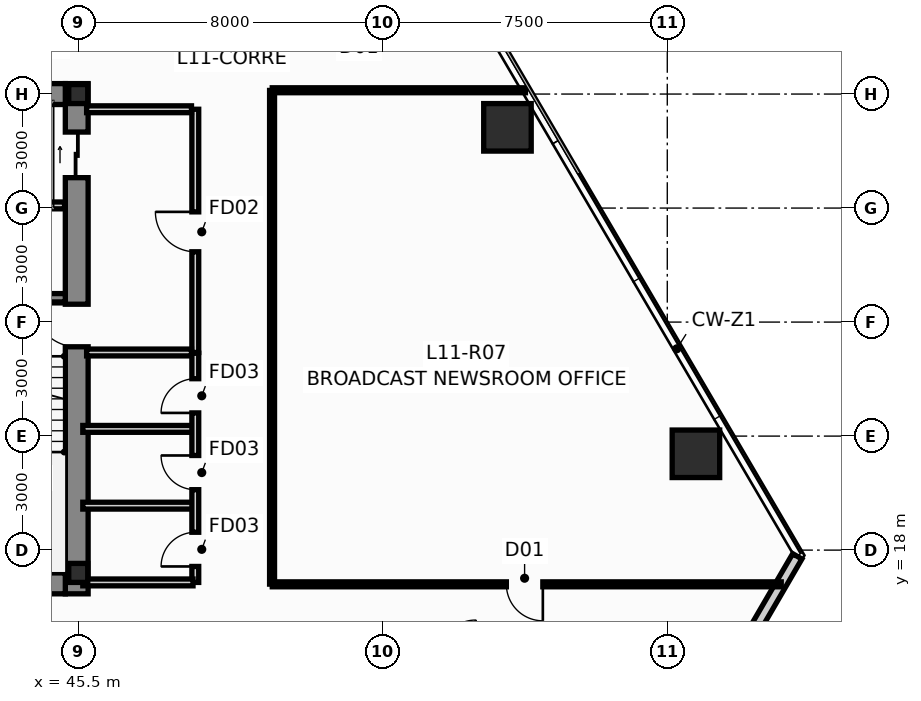
"""IFC4 building model, lengths in metres.
Left out: names, types, materials, properties, quantities, classifications, styles, units other than length and angle.
Written with IfcOpenShell. Run it as: python <this file> out.ifc"""

import sys

from ifc_helpers import new_model, si_unit, direction, frame, frame_2d, origin, origin_2d, place, context, subcontext, project, spatial, rectangle, hollow_rectangle, i_section, extrude, source, transform, mapped, element, fill, save


model = new_model("IFC4")
c1 = context("Model", 3, precision=1e-05, world=origin(), true_north=direction((0.0, 1.0)))
c2 = subcontext(c1, "Body", "Model", "MODEL_VIEW")
j1 = project(units=[si_unit("LENGTHUNIT", "METRE"), si_unit("PLANEANGLEUNIT", "RADIAN")], contexts=[c1])
p1 = place(None, origin())
s1 = spatial("IfcSite", under=j1, at=p1, CompositionType="ELEMENT")
p2 = place(p1, origin())
s2 = spatial("IfcBuilding", under=s1, at=p2, CompositionType="ELEMENT")
p3 = place(p2, frame((0.0, 0.0, 45.85)))
s3 = spatial("IfcBuildingStorey", under=s2, at=p3, CompositionType="ELEMENT", Elevation=45.85)
m1 = source(origin(), c2, "Body", "SweptSolid", [
    extrude(i_section(OverallWidth=0.5, OverallDepth=0.5, WebThickness=0.028, FlangeThickness=0.04, at=origin_2d()), origin(), (0.0, 0.0, 1.0), 3.65),
])
for number, where, z_axis, x_axis in (
    (1, (45.5, 17.4, 0.0), (0.0, 0.0, 1.0), (1.0, 0.0, 0.0)),
    (2, (45.5, 30.0, 0.0), (0.0, 0.0, 1.0), (1.0, 0.0, 0.0)),
):
    element("IfcColumn", number, at=place(p3, frame(where, z_axis=z_axis, x_axis=x_axis)), inside=s3, PredefinedType="COLUMN", context=c2, shape_type="MappedRepresentation", body=[
        mapped(m1, transform((0.0, 0.0, 0.0), scale=1.0)),
    ])
p4 = place(p3, frame((45.46, 16.85, 0.0), z_axis=(0.0, 0.0, 1.0), x_axis=(0.0, 1.0, 0.0)))
e3 = element("IfcWall", 3, at=p4, inside=s3, PredefinedType="SHEAR", context=c2, shape_type="SweptSolid", body=[
    extrude(rectangle(XDim=13.425, YDim=0.6, at=frame_2d((6.712, 0.0))), origin(), (0.0, 0.0, 1.0), 3.65),
])
p5 = place(p4, frame((6.5, 0.0, 0.0)))
e4 = element("IfcOpeningElement", 4, at=p5, cuts=e3, PredefinedType="OPENING", context=c2, shape_type="SweptSolid", body=[
    extrude(rectangle(XDim=1.12, YDim=2.15, at=frame_2d((0.56, 1.075))), frame((0.0, 0.312, 0.0), z_axis=(0.0, -1.0, 0.0), x_axis=(1.0, 0.0, 0.0)), (0.0, 0.0, 1.0), 0.624),
])
p6 = place(p4, frame((10.95, 0.0, 0.0)))
e5 = element("IfcOpeningElement", 5, at=p6, cuts=e3, PredefinedType="OPENING", context=c2, shape_type="SweptSolid", body=[
    extrude(rectangle(XDim=1.2, YDim=2.2, at=frame_2d((0.6, 1.1))), frame((0.0, 0.312, 0.0), z_axis=(0.0, -1.0, 0.0), x_axis=(1.0, 0.0, 0.0)), (0.0, 0.0, 1.0), 0.624),
])
for number, where, z_axis, x_axis in (
    (6, (42.26, 17.125, 0.0), (0.0, 0.0, 1.0), (1.0, 0.0, 0.0)),
    (7, (42.26, 30.0, 0.0), (0.0, 0.0, 1.0), (1.0, 0.0, 0.0)),
):
    element("IfcWall", number, at=place(p3, frame(where, z_axis=z_axis, x_axis=x_axis)), inside=s3, PredefinedType="SHEAR", context=c2, shape_type="SweptSolid", body=[
        extrude(rectangle(XDim=2.9, YDim=0.55, at=frame_2d((1.45, 0.0))), origin(), (0.0, 0.0, 1.0), 3.65),
    ])
p7 = place(p3, frame((42.26, 24.64, 0.0), z_axis=(0.0, 0.0, 1.0), x_axis=(1.0, 0.0, 0.0)))
e8 = element("IfcWall", 8, at=p7, inside=s3, PredefinedType="SHEAR", context=c2, shape_type="SweptSolid", body=[
    extrude(rectangle(XDim=2.9, YDim=0.22, at=frame_2d((1.45, 0.0))), origin(), (0.0, 0.0, 1.0), 3.65),
])
m2 = source(origin(), c2, "Body", "SweptSolid", [
    extrude(hollow_rectangle(XDim=1.25, YDim=1.25, WallThickness=0.07, at=origin_2d()), origin(), (0.0, 0.0, 1.0), 3.651),
])
p8 = place(p3, frame((61.754, 20.534, 0.0), z_axis=(-0.010364932146, -0.021532310652, 0.999714423113), x_axis=(0.901042175273, -0.433731481886, 0.0)))
e9 = element("IfcColumn", 9, at=p8, inside=s3, PredefinedType="COLUMN", context=c2, shape_type="MappedRepresentation", body=[
    mapped(m2, transform((0.0, 0.0, 0.0), scale=1.0)),
])
m3 = source(origin(), c2, "Body", "SweptSolid", [
    extrude(hollow_rectangle(XDim=1.25, YDim=1.25, WallThickness=0.07, at=origin_2d()), origin(), (0.0, 0.0, 1.0), 3.651),
])
p9 = place(p3, frame((56.794, 29.124, 0.0), z_axis=(-0.014846452328, -0.013776437746, 0.99979487527), x_axis=(0.68019775991, -0.733028653883, 0.0)))
e10 = element("IfcColumn", 10, at=p9, inside=s3, PredefinedType="COLUMN", context=c2, shape_type="MappedRepresentation", body=[
    mapped(m3, transform((0.0, 0.0, 0.0), scale=1.0)),
])
p10 = place(p3, frame((64.421, 17.836, 0.0), z_axis=(0.0, 0.0, 1.0), x_axis=(-0.503265705676, -0.864131719989, 0.0)))
e11 = element("IfcWall", 11, at=p10, inside=s3, PredefinedType="STANDARD", context=c2, shape_type="SweptSolid", body=[
    extrude(rectangle(XDim=15.852, YDim=0.28, at=frame_2d((7.926, 0.0))), origin(), (0.0, 0.0, 1.0), 3.4),
])
p11 = place(p10, frame((7.03, 0.0, 0.9)))
e12 = element("IfcOpeningElement", 12, at=p11, cuts=e11, PredefinedType="OPENING", context=c2, shape_type="SweptSolid", body=[
    extrude(rectangle(XDim=1.8, YDim=1.8, at=frame_2d((0.9, 0.9))), frame((0.0, 0.152, 0.0), z_axis=(0.0, -1.0, 0.0), x_axis=(1.0, 0.0, 0.0)), (0.0, 0.0, 1.0), 0.304),
])
p12 = place(p3, frame((48.58, 23.2, 0.0), z_axis=(0.0, 0.0, 1.0), x_axis=(0.0, 1.0, 0.0)))
e13 = element("IfcWall", 13, at=p12, inside=s3, PredefinedType="PARTITIONING", context=c2, shape_type="SweptSolid", body=[
    extrude(rectangle(XDim=6.4, YDim=0.18, at=frame_2d((3.2, 0.0))), origin(), (0.0, 0.0, 1.0), 3.026),
])
p13 = place(p12, frame((2.65, 0.0, 0.0)))
e14 = element("IfcOpeningElement", 14, at=p13, cuts=e13, PredefinedType="OPENING", context=c2, shape_type="SweptSolid", body=[
    extrude(rectangle(XDim=1.05, YDim=2.15, at=frame_2d((0.525, 1.075))), frame((0.0, 0.102, 0.0), z_axis=(0.0, -1.0, 0.0), x_axis=(1.0, 0.0, 0.0)), (0.0, 0.0, 1.0), 0.204),
])
p14 = place(p3, frame((45.72, 23.2, 0.0), z_axis=(0.0, 0.0, 1.0), x_axis=(1.0, 0.0, 0.0)))
e15 = element("IfcWall", 15, at=p14, inside=s3, PredefinedType="PARTITIONING", context=c2, shape_type="SweptSolid", body=[
    extrude(rectangle(XDim=2.76, YDim=0.18, at=frame_2d((1.38, 0.0))), origin(), (0.0, 0.0, 1.0), 3.4),
])
p15 = place(p3, frame((45.72, 29.6, 0.0), z_axis=(0.0, 0.0, 1.0), x_axis=(1.0, 0.0, 0.0)))
e16 = element("IfcWall", 16, at=p15, inside=s3, PredefinedType="PARTITIONING", context=c2, shape_type="SweptSolid", body=[
    extrude(rectangle(XDim=2.76, YDim=0.18, at=frame_2d((1.38, 0.0))), origin(), (0.0, 0.0, 1.0), 2.783),
])
for number, where, z_axis, x_axis in (
    (17, (42.24, 27.07, 0.0), (0.0, 0.0, 1.0), (1.0, 0.0, 0.0)),
    (18, (45.62, 19.17, 0.0), (0.0, 0.0, 1.0), (1.0, 0.0, 0.0)),
    (19, (45.62, 21.19, 0.0), (0.0, 0.0, 1.0), (1.0, 0.0, 0.0)),
):
    element("IfcWall", number, at=place(p3, frame(where, z_axis=z_axis, x_axis=x_axis)), inside=s3, PredefinedType="PARTITIONING", context=c2, shape_type="SweptSolid", body=[
        extrude(rectangle(XDim=2.9, YDim=0.18, at=frame_2d((1.45, 0.0))), origin(), (0.0, 0.0, 1.0), 3.4),
    ])
p16 = place(p3, frame((48.58, 17.15, 0.0), z_axis=(0.0, 0.0, 1.0), x_axis=(0.0, 1.0, 0.0)))
e20 = element("IfcWall", 20, at=p16, inside=s3, PredefinedType="PARTITIONING", context=c2, shape_type="SweptSolid", body=[
    extrude(rectangle(XDim=6.03, YDim=0.18, at=frame_2d((3.015, 0.0))), origin(), (0.0, 0.0, 1.0), 3.4),
])
p17 = place(p16, frame((0.42, 0.0, 0.0)))
e21 = element("IfcOpeningElement", 21, at=p17, cuts=e20, PredefinedType="OPENING", context=c2, shape_type="SweptSolid", body=[
    extrude(rectangle(XDim=0.9, YDim=2.1, at=frame_2d((0.45, 1.05))), frame((0.0, 0.102, 0.0), z_axis=(0.0, -1.0, 0.0), x_axis=(1.0, 0.0, 0.0)), (0.0, 0.0, 1.0), 0.204),
])
p18 = place(p16, frame((2.44, 0.0, 0.0)))
e22 = element("IfcOpeningElement", 22, at=p18, cuts=e20, PredefinedType="OPENING", context=c2, shape_type="SweptSolid", body=[
    extrude(rectangle(XDim=0.9, YDim=2.1, at=frame_2d((0.45, 1.05))), frame((0.0, 0.102, 0.0), z_axis=(0.0, -1.0, 0.0), x_axis=(1.0, 0.0, 0.0)), (0.0, 0.0, 1.0), 0.204),
])
p19 = place(p16, frame((4.46, 0.0, 0.0)))
e23 = element("IfcOpeningElement", 23, at=p19, cuts=e20, PredefinedType="OPENING", context=c2, shape_type="SweptSolid", body=[
    extrude(rectangle(XDim=0.9, YDim=2.1, at=frame_2d((0.45, 1.05))), frame((0.0, 0.102, 0.0), z_axis=(0.0, -1.0, 0.0), x_axis=(1.0, 0.0, 0.0)), (0.0, 0.0, 1.0), 0.204),
])
p20 = place(p3, frame((45.62, 17.15, 0.0), z_axis=(0.0, 0.0, 1.0), x_axis=(1.0, 0.0, 0.0)))
e24 = element("IfcWall", 24, at=p20, inside=s3, PredefinedType="PARTITIONING", context=c2, shape_type="SweptSolid", body=[
    extrude(rectangle(XDim=2.9, YDim=0.18, at=frame_2d((1.45, 0.0))), origin(), (0.0, 0.0, 1.0), 2.783),
])
p21 = place(p3, frame((63.998, 17.1, 0.0), z_axis=(0.0, 0.0, 1.0), x_axis=(-1.0, 0.0, 0.0)))
e25 = element("IfcWall", 25, at=p21, inside=s3, PredefinedType="PARTITIONING", context=c2, shape_type="SweptSolid", body=[
    extrude(rectangle(XDim=13.393, YDim=0.13, at=frame_2d((6.697, 0.0))), origin(), (0.0, 0.0, 1.0), 3.4),
])
p22 = place(p21, frame((6.273, 0.0, 0.0)))
e26 = element("IfcOpeningElement", 26, at=p22, cuts=e25, PredefinedType="OPENING", context=c2, shape_type="SweptSolid", body=[
    extrude(rectangle(XDim=0.96, YDim=2.15, at=frame_2d((0.48, 1.075))), frame((0.0, 0.077, 0.0), z_axis=(0.0, -1.0, 0.0), x_axis=(1.0, 0.0, 0.0)), (0.0, 0.0, 1.0), 0.154),
])
p23 = place(p3, frame((50.6, 17.105, 0.0), z_axis=(0.0, 0.0, 1.0), x_axis=(0.0, 1.0, 0.0)))
e27 = element("IfcWall", 27, at=p23, inside=s3, PredefinedType="PARTITIONING", context=c2, shape_type="SweptSolid", body=[
    extrude(rectangle(XDim=12.99, YDim=0.13, at=frame_2d((6.495, 0.0))), origin(), (0.0, 0.0, 1.0), 3.026),
])
p24 = place(p3, frame((50.605, 30.1, 0.0), z_axis=(0.0, 0.0, 1.0), x_axis=(1.0, 0.0, 0.0)))
e28 = element("IfcWall", 28, at=p24, inside=s3, PredefinedType="PARTITIONING", context=c2, shape_type="SweptSolid", body=[
    extrude(rectangle(XDim=6.663, YDim=0.13, at=frame_2d((3.332, 0.0))), origin(), (0.0, 0.0, 1.0), 2.783),
])
p25 = place(p5, origin())
e29 = element("IfcDoor", 29, at=p25, inside=s3, OperationType="SINGLE_SWING_RIGHT", PredefinedType="DOOR", context=c2, shape_type="SweptSolid", body=[
    extrude(rectangle(XDim=1.12, YDim=2.15, at=frame_2d((0.56, 1.075))), frame((0.0, 0.025, 0.0), z_axis=(0.0, -1.0, 0.0), x_axis=(1.0, 0.0, 0.0)), (0.0, 0.0, 1.0), 0.05),
])
fill(e4, e29)
p26 = place(p6, origin())
e30 = element("IfcDoor", 30, at=p26, inside=s3, OperationType="SLIDING_TO_RIGHT", PredefinedType="DOOR", context=c2, shape_type="SweptSolid", body=[
    extrude(rectangle(XDim=1.2, YDim=2.2, at=frame_2d((0.6, 1.1))), frame((0.0, 0.025, 0.0), z_axis=(0.0, -1.0, 0.0), x_axis=(1.0, 0.0, 0.0)), (0.0, 0.0, 1.0), 0.05),
])
fill(e5, e30)
p27 = place(p13, origin())
e31 = element("IfcDoor", 31, at=p27, inside=s3, OperationType="SINGLE_SWING_RIGHT", PredefinedType="DOOR", context=c2, shape_type="SweptSolid", body=[
    extrude(rectangle(XDim=1.05, YDim=2.15, at=frame_2d((0.525, 1.075))), frame((0.0, 0.025, 0.0), z_axis=(0.0, -1.0, 0.0), x_axis=(1.0, 0.0, 0.0)), (0.0, 0.0, 1.0), 0.05),
])
fill(e14, e31)
p28 = place(p17, origin())
e32 = element("IfcDoor", 32, at=p28, inside=s3, OperationType="SINGLE_SWING_LEFT", PredefinedType="DOOR", context=c2, shape_type="SweptSolid", body=[
    extrude(rectangle(XDim=0.9, YDim=2.1, at=frame_2d((0.45, 1.05))), frame((0.0, 0.025, 0.0), z_axis=(0.0, -1.0, 0.0), x_axis=(1.0, 0.0, 0.0)), (0.0, 0.0, 1.0), 0.05),
])
fill(e21, e32)
p29 = place(p18, origin())
e33 = element("IfcDoor", 33, at=p29, inside=s3, OperationType="SINGLE_SWING_RIGHT", PredefinedType="DOOR", context=c2, shape_type="SweptSolid", body=[
    extrude(rectangle(XDim=0.9, YDim=2.1, at=frame_2d((0.45, 1.05))), frame((0.0, 0.025, 0.0), z_axis=(0.0, -1.0, 0.0), x_axis=(1.0, 0.0, 0.0)), (0.0, 0.0, 1.0), 0.05),
])
fill(e22, e33)
p30 = place(p19, origin())
e34 = element("IfcDoor", 34, at=p30, inside=s3, OperationType="SINGLE_SWING_LEFT", PredefinedType="DOOR", context=c2, shape_type="SweptSolid", body=[
    extrude(rectangle(XDim=0.9, YDim=2.1, at=frame_2d((0.45, 1.05))), frame((0.0, 0.025, 0.0), z_axis=(0.0, -1.0, 0.0), x_axis=(1.0, 0.0, 0.0)), (0.0, 0.0, 1.0), 0.05),
])
fill(e23, e34)
p31 = place(p22, origin())
e35 = element("IfcDoor", 35, at=p31, inside=s3, OperationType="SINGLE_SWING_LEFT", PredefinedType="DOOR", context=c2, shape_type="SweptSolid", body=[
    extrude(rectangle(XDim=0.96, YDim=2.15, at=frame_2d((0.48, 1.075))), frame((0.0, 0.025, 0.0), z_axis=(0.0, -1.0, 0.0), x_axis=(1.0, 0.0, 0.0)), (0.0, 0.0, 1.0), 0.05),
])
fill(e26, e35)
save(model, sys.argv[1])
